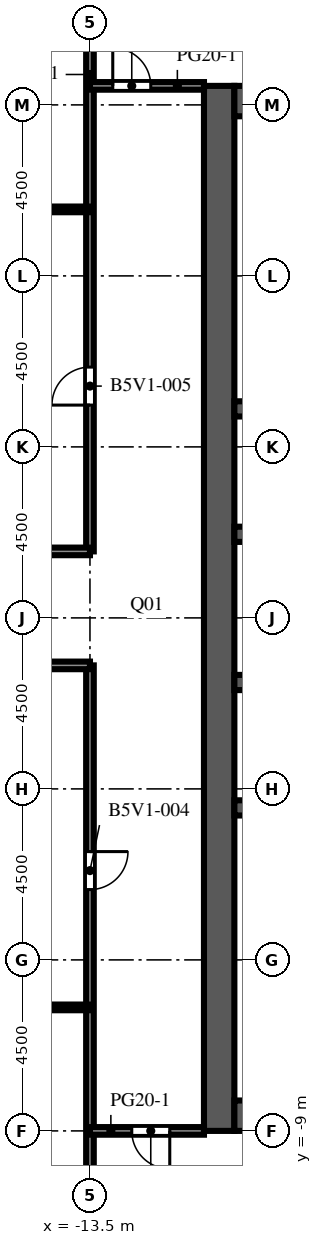
"""IFC4 building model, lengths in metres.
Left out: names, types, materials, properties, quantities, classifications, styles, units other than length and angle.
Written with IfcOpenShell. Run it as: python <this file> out.ifc"""

import sys

from ifc_helpers import new_model, si_unit, direction, frame, frame_2d, origin, place, context, subcontext, project, spatial, rectangle, extrude, element, fill, save


model = new_model("IFC4")
c1 = context("Model", 3, precision=1e-05, world=origin(), true_north=direction((0.0, 1.0)))
c2 = subcontext(c1, "Body", "Model", "MODEL_VIEW")
j1 = project(units=[si_unit("LENGTHUNIT", "METRE"), si_unit("PLANEANGLEUNIT", "RADIAN")], contexts=[c1])
p1 = place(None, origin())
s1 = spatial("IfcSite", under=j1, at=p1, CompositionType="ELEMENT")
p2 = place(p1, origin())
s2 = spatial("IfcBuilding", under=s1, at=p2, CompositionType="ELEMENT")
p3 = place(p2, frame((0.0, 0.0, 173.2)))
s3 = spatial("IfcBuildingStorey", under=s2, at=p3, CompositionType="ELEMENT", Elevation=173.2)
p4 = place(p3, frame((-10.1, -9.0, 0.0), z_axis=(0.0, 0.0, 1.0), x_axis=(0.0, 1.0, 0.0)))
e1 = element("IfcWall", 1, at=p4, inside=s3, PredefinedType="SHEAR", context=c2, shape_type="SweptSolid", body=[
    extrude(rectangle(XDim=27.5, YDim=0.8, at=frame_2d((13.75, 0.0))), origin(), (0.0, 0.0, 1.0), 4.1),
])
p5 = place(p4, frame((12.55, 0.0, 0.0)))
e2 = element("IfcOpeningElement", 2, at=p5, cuts=e1, PredefinedType="OPENING", context=c2, shape_type="SweptSolid", body=[
    extrude(rectangle(XDim=2.4, YDim=2.4, at=frame_2d((1.2, 1.2))), frame((0.0, 0.41, 0.0), z_axis=(0.0, -1.0, 0.0), x_axis=(1.0, 0.0, 0.0)), (0.0, 0.0, 1.0), 0.82),
])
p6 = place(p4, frame((6.825, 0.0, 0.0)))
e3 = element("IfcOpeningElement", 3, at=p6, cuts=e1, PredefinedType="OPENING", context=c2, shape_type="SweptSolid", body=[
    extrude(rectangle(XDim=1.2, YDim=2.1, at=frame_2d((0.6, 1.05))), frame((0.0, 0.41, 0.0), z_axis=(0.0, -1.0, 0.0), x_axis=(1.0, 0.0, 0.0)), (0.0, 0.0, 1.0), 0.82),
])
p7 = place(p4, frame((19.475, 0.0, 0.0)))
e4 = element("IfcOpeningElement", 4, at=p7, cuts=e1, PredefinedType="OPENING", context=c2, shape_type="SweptSolid", body=[
    extrude(rectangle(XDim=1.2, YDim=2.1, at=frame_2d((0.6, 1.05))), frame((0.0, 0.41, 0.0), z_axis=(0.0, -1.0, 0.0), x_axis=(1.0, 0.0, 0.0)), (0.0, 0.0, 1.0), 0.82),
])
for number, where, z_axis, x_axis in (
    (5, (-9.7, -8.6, 0.0), (0.0, 0.0, 1.0), (1.0, 0.0, 0.0)),
    (6, (-9.7, 18.1, 0.0), (0.0, 0.0, 1.0), (1.0, 0.0, 0.0)),
):
    element("IfcWall", number, at=place(p3, frame(where, z_axis=z_axis, x_axis=x_axis)), inside=s3, PredefinedType="SHEAR", context=c2, shape_type="SweptSolid", body=[
        extrude(rectangle(XDim=10.4, YDim=0.8, at=frame_2d((5.2, 0.0))), origin(), (0.0, 0.0, 1.0), 4.1),
    ])
p8 = place(p3, frame((-9.7, -0.5, 0.0), z_axis=(0.0, 0.0, 1.0), x_axis=(1.0, 0.0, 0.0)))
e7 = element("IfcWall", 7, at=p8, inside=s3, PredefinedType="SHEAR", context=c2, shape_type="SweptSolid", body=[
    extrude(rectangle(XDim=10.4, YDim=0.4, at=frame_2d((5.2, 0.0))), origin(), (0.0, 0.0, 1.0), 4.1),
])
p9 = place(p3, frame((-9.7, 2.8, 0.0), z_axis=(0.0, 0.0, 1.0), x_axis=(1.0, 0.0, 0.0)))
e8 = element("IfcWall", 8, at=p9, inside=s3, PredefinedType="SHEAR", context=c2, shape_type="SweptSolid", body=[
    extrude(rectangle(XDim=10.4, YDim=0.4, at=frame_2d((5.2, 0.0))), origin(), (0.0, 0.0, 1.0), 4.1),
])
p10 = place(p9, frame((0.738, 0.0, 0.0)))
e9 = element("IfcOpeningElement", 9, at=p10, cuts=e8, PredefinedType="OPENING", context=c2, shape_type="SweptSolid", body=[
    extrude(rectangle(XDim=1.1, YDim=2.1, at=frame_2d((0.55, 1.05))), frame((0.0, 0.21, 0.0), z_axis=(0.0, -1.0, 0.0), x_axis=(1.0, 0.0, 0.0)), (0.0, 0.0, 1.0), 0.42),
])
p11 = place(p9, frame((3.337, 0.0, 0.0)))
e10 = element("IfcOpeningElement", 10, at=p11, cuts=e8, PredefinedType="OPENING", context=c2, shape_type="SweptSolid", body=[
    extrude(rectangle(XDim=1.1, YDim=2.1, at=frame_2d((0.55, 1.05))), frame((0.0, 0.21, 0.0), z_axis=(0.0, -1.0, 0.0), x_axis=(1.0, 0.0, 0.0)), (0.0, 0.0, 1.0), 0.42),
])
p12 = place(p9, frame((6.012, 0.0, 0.0)))
e11 = element("IfcOpeningElement", 11, at=p12, cuts=e8, PredefinedType="OPENING", context=c2, shape_type="SweptSolid", body=[
    extrude(rectangle(XDim=1.0, YDim=2.1, at=frame_2d((0.5, 1.05))), frame((0.0, 0.21, 0.0), z_axis=(0.0, -1.0, 0.0), x_axis=(1.0, 0.0, 0.0)), (0.0, 0.0, 1.0), 0.42),
])
p13 = place(p9, frame((8.613, 0.0, 0.0)))
e12 = element("IfcOpeningElement", 12, at=p13, cuts=e8, PredefinedType="OPENING", context=c2, shape_type="SweptSolid", body=[
    extrude(rectangle(XDim=1.0, YDim=2.1, at=frame_2d((0.5, 1.05))), frame((0.0, 0.21, 0.0), z_axis=(0.0, -1.0, 0.0), x_axis=(1.0, 0.0, 0.0)), (0.0, 0.0, 1.0), 0.42),
])
p14 = place(p3, frame((-9.7, 6.7, 0.0), z_axis=(0.0, 0.0, 1.0), x_axis=(1.0, 0.0, 0.0)))
e13 = element("IfcWall", 13, at=p14, inside=s3, PredefinedType="SHEAR", context=c2, shape_type="SweptSolid", body=[
    extrude(rectangle(XDim=10.4, YDim=0.4, at=frame_2d((5.2, 0.0))), origin(), (0.0, 0.0, 1.0), 4.1),
])
p15 = place(p14, frame((3.337, 0.0, 0.0)))
e14 = element("IfcOpeningElement", 14, at=p15, cuts=e13, PredefinedType="OPENING", context=c2, shape_type="SweptSolid", body=[
    extrude(rectangle(XDim=1.1, YDim=2.1, at=frame_2d((0.55, 1.05))), frame((0.0, 0.21, 0.0), z_axis=(0.0, -1.0, 0.0), x_axis=(1.0, 0.0, 0.0)), (0.0, 0.0, 1.0), 0.42),
])
p16 = place(p14, frame((5.962, 0.0, 0.0)))
e15 = element("IfcOpeningElement", 15, at=p16, cuts=e13, PredefinedType="OPENING", context=c2, shape_type="SweptSolid", body=[
    extrude(rectangle(XDim=1.1, YDim=2.1, at=frame_2d((0.55, 1.05))), frame((0.0, 0.21, 0.0), z_axis=(0.0, -1.0, 0.0), x_axis=(1.0, 0.0, 0.0)), (0.0, 0.0, 1.0), 0.42),
])
p17 = place(p14, frame((8.663, 0.0, 0.0)))
e16 = element("IfcOpeningElement", 16, at=p17, cuts=e13, PredefinedType="OPENING", context=c2, shape_type="SweptSolid", body=[
    extrude(rectangle(XDim=1.1, YDim=2.1, at=frame_2d((0.55, 1.05))), frame((0.0, 0.21, 0.0), z_axis=(0.0, -1.0, 0.0), x_axis=(1.0, 0.0, 0.0)), (0.0, 0.0, 1.0), 0.42),
])
p18 = place(p14, frame((0.688, 0.0, 0.0)))
e17 = element("IfcOpeningElement", 17, at=p18, cuts=e13, PredefinedType="OPENING", context=c2, shape_type="SweptSolid", body=[
    extrude(rectangle(XDim=1.0, YDim=2.1, at=frame_2d((0.5, 1.05))), frame((0.0, 0.21, 0.0), z_axis=(0.0, -1.0, 0.0), x_axis=(1.0, 0.0, 0.0)), (0.0, 0.0, 1.0), 0.42),
])
p19 = place(p3, frame((-9.7, 10.0, 0.0), z_axis=(0.0, 0.0, 1.0), x_axis=(1.0, 0.0, 0.0)))
e18 = element("IfcWall", 18, at=p19, inside=s3, PredefinedType="SHEAR", context=c2, shape_type="SweptSolid", body=[
    extrude(rectangle(XDim=10.4, YDim=0.4, at=frame_2d((5.2, 0.0))), origin(), (0.0, 0.0, 1.0), 4.1),
])
p20 = place(p3, frame((-13.5, -26.5, 0.0), z_axis=(0.0, 0.0, 1.0), x_axis=(0.0, 1.0, 0.0)))
e19 = element("IfcWall", 19, at=p20, inside=s3, PredefinedType="PARTITIONING", context=c2, shape_type="SweptSolid", body=[
    extrude(rectangle(XDim=29.75, YDim=0.2, at=frame_2d((14.875, 0.0))), origin(), (0.0, 0.0, 1.0), 3.65),
])
p21 = place(p20, frame((23.85, 0.0, 0.0)))
e20 = element("IfcOpeningElement", 20, at=p21, cuts=e19, PredefinedType="OPENING", context=c2, shape_type="SweptSolid", body=[
    extrude(rectangle(XDim=1.0, YDim=2.1, at=frame_2d((0.5, 1.05))), frame((0.0, 0.11, 0.0), z_axis=(0.0, -1.0, 0.0), x_axis=(1.0, 0.0, 0.0)), (0.0, 0.0, 1.0), 0.22),
])
p22 = place(p3, frame((-13.5, 6.25, 0.0), z_axis=(0.0, 0.0, 1.0), x_axis=(0.0, 1.0, 0.0)))
e21 = element("IfcWall", 21, at=p22, inside=s3, PredefinedType="PARTITIONING", context=c2, shape_type="SweptSolid", body=[
    extrude(rectangle(XDim=20.25, YDim=0.2, at=frame_2d((10.125, 0.0))), origin(), (0.0, 0.0, 1.0), 3.65),
])
p23 = place(p22, frame((3.85, 0.0, 0.0)))
e22 = element("IfcOpeningElement", 22, at=p23, cuts=e21, PredefinedType="OPENING", context=c2, shape_type="SweptSolid", body=[
    extrude(rectangle(XDim=1.0, YDim=2.1, at=frame_2d((0.5, 1.05))), frame((0.0, 0.11, 0.0), z_axis=(0.0, -1.0, 0.0), x_axis=(1.0, 0.0, 0.0)), (0.0, 0.0, 1.0), 0.22),
])
p24 = place(p3, frame((-10.5, -9.0, 0.0), z_axis=(0.0, 0.0, 1.0), x_axis=(-1.0, 0.0, 0.0)))
e23 = element("IfcWall", 23, at=p24, inside=s3, PredefinedType="PARTITIONING", context=c2, shape_type="SweptSolid", body=[
    extrude(rectangle(XDim=3.0, YDim=0.2, at=frame_2d((1.5, 0.0))), origin(), (0.0, 0.0, 1.0), 3.65),
])
p25 = place(p24, frame((0.9, 0.0, 0.0)))
e24 = element("IfcOpeningElement", 24, at=p25, cuts=e23, PredefinedType="OPENING", context=c2, shape_type="SweptSolid", body=[
    extrude(rectangle(XDim=1.0, YDim=2.1, at=frame_2d((0.5, 1.05))), frame((0.0, 0.11, 0.0), z_axis=(0.0, -1.0, 0.0), x_axis=(1.0, 0.0, 0.0)), (0.0, 0.0, 1.0), 0.22),
])
p26 = place(p3, frame((-13.5, -5.75, 0.0), z_axis=(0.0, 0.0, 1.0), x_axis=(-1.0, 0.0, 0.0)))
e25 = element("IfcWall", 25, at=p26, inside=s3, PredefinedType="PARTITIONING", context=c2, shape_type="SweptSolid", body=[
    extrude(rectangle(XDim=13.35, YDim=0.15, at=frame_2d((6.675, 0.0))), origin(), (0.0, 0.0, 1.0), 3.65),
])
p27 = place(p26, frame((8.9, 0.0, 0.0)))
e26 = element("IfcOpeningElement", 26, at=p27, cuts=e25, PredefinedType="OPENING", context=c2, shape_type="SweptSolid", body=[
    extrude(rectangle(XDim=1.0, YDim=2.1, at=frame_2d((0.5, 1.05))), frame((0.0, 0.085, 0.0), z_axis=(0.0, -1.0, 0.0), x_axis=(1.0, 0.0, 0.0)), (0.0, 0.0, 1.0), 0.17),
])
p28 = place(p26, frame((1.65, 0.0, 0.0)))
e27 = element("IfcOpeningElement", 27, at=p28, cuts=e25, PredefinedType="OPENING", context=c2, shape_type="SweptSolid", body=[
    extrude(rectangle(XDim=1.0, YDim=2.1, at=frame_2d((0.5, 1.05))), frame((0.0, 0.085, 0.0), z_axis=(0.0, -1.0, 0.0), x_axis=(1.0, 0.0, 0.0)), (0.0, 0.0, 1.0), 0.17),
])
p29 = place(p3, frame((-13.5, 3.25, 0.0), z_axis=(0.0, 0.0, 1.0), x_axis=(-1.0, 0.0, 0.0)))
e28 = element("IfcWall", 28, at=p29, inside=s3, PredefinedType="PARTITIONING", context=c2, shape_type="SweptSolid", body=[
    extrude(rectangle(XDim=13.35, YDim=0.2, at=frame_2d((6.675, 0.0))), origin(), (0.0, 0.0, 1.0), 3.65),
])
p30 = place(p29, frame((8.15, 0.0, 0.0)))
e29 = element("IfcOpeningElement", 29, at=p30, cuts=e28, PredefinedType="OPENING", context=c2, shape_type="SweptSolid", body=[
    extrude(rectangle(XDim=1.0, YDim=2.1, at=frame_2d((0.5, 1.05))), frame((0.0, 0.11, 0.0), z_axis=(0.0, -1.0, 0.0), x_axis=(1.0, 0.0, 0.0)), (0.0, 0.0, 1.0), 0.22),
])
p31 = place(p3, frame((-26.85, 6.25, 0.0), z_axis=(0.0, 0.0, 1.0), x_axis=(1.0, 0.0, 0.0)))
e30 = element("IfcWall", 30, at=p31, inside=s3, PredefinedType="PARTITIONING", context=c2, shape_type="SweptSolid", body=[
    extrude(rectangle(XDim=13.35, YDim=0.2, at=frame_2d((6.675, 0.0))), origin(), (0.0, 0.0, 1.0), 3.65),
])
p32 = place(p31, frame((2.45, 0.0, 0.0)))
e31 = element("IfcOpeningElement", 31, at=p32, cuts=e30, PredefinedType="OPENING", context=c2, shape_type="SweptSolid", body=[
    extrude(rectangle(XDim=1.0, YDim=2.1, at=frame_2d((0.5, 1.05))), frame((0.0, 0.11, 0.0), z_axis=(0.0, -1.0, 0.0), x_axis=(1.0, 0.0, 0.0)), (0.0, 0.0, 1.0), 0.22),
])
p33 = place(p3, frame((-26.85, 15.25, 0.0), z_axis=(0.0, 0.0, 1.0), x_axis=(1.0, 0.0, 0.0)))
e32 = element("IfcWall", 32, at=p33, inside=s3, PredefinedType="PARTITIONING", context=c2, shape_type="SweptSolid", body=[
    extrude(rectangle(XDim=13.35, YDim=0.15, at=frame_2d((6.675, 0.0))), origin(), (0.0, 0.0, 1.0), 3.65),
])
p34 = place(p33, frame((2.95, 0.0, 0.0)))
e33 = element("IfcOpeningElement", 33, at=p34, cuts=e32, PredefinedType="OPENING", context=c2, shape_type="SweptSolid", body=[
    extrude(rectangle(XDim=1.0, YDim=2.1, at=frame_2d((0.5, 1.05))), frame((0.0, 0.085, 0.0), z_axis=(0.0, -1.0, 0.0), x_axis=(1.0, 0.0, 0.0)), (0.0, 0.0, 1.0), 0.17),
])
p35 = place(p33, frame((10.2, 0.0, 0.0)))
e34 = element("IfcOpeningElement", 34, at=p35, cuts=e32, PredefinedType="OPENING", context=c2, shape_type="SweptSolid", body=[
    extrude(rectangle(XDim=1.0, YDim=2.1, at=frame_2d((0.5, 1.05))), frame((0.0, 0.085, 0.0), z_axis=(0.0, -1.0, 0.0), x_axis=(1.0, 0.0, 0.0)), (0.0, 0.0, 1.0), 0.17),
])
p36 = place(p3, frame((-13.5, 18.5, 0.0), z_axis=(0.0, 0.0, 1.0), x_axis=(1.0, 0.0, 0.0)))
e35 = element("IfcWall", 35, at=p36, inside=s3, PredefinedType="PARTITIONING", context=c2, shape_type="SweptSolid", body=[
    extrude(rectangle(XDim=3.0, YDim=0.2, at=frame_2d((1.5, 0.0))), origin(), (0.0, 0.0, 1.0), 3.65),
])
p37 = place(p36, frame((0.6, 0.0, 0.0)))
e36 = element("IfcOpeningElement", 36, at=p37, cuts=e35, PredefinedType="OPENING", context=c2, shape_type="SweptSolid", body=[
    extrude(rectangle(XDim=1.0, YDim=2.1, at=frame_2d((0.5, 1.05))), frame((0.0, 0.11, 0.0), z_axis=(0.0, -1.0, 0.0), x_axis=(1.0, 0.0, 0.0)), (0.0, 0.0, 1.0), 0.22),
])
p38 = place(p5, origin())
e37 = element("IfcDoor", 37, at=p38, inside=s3, OperationType="DOUBLE_DOOR_DOUBLE_SWING", PredefinedType="DOOR", context=c2, shape_type="SweptSolid", body=[
    extrude(rectangle(XDim=2.4, YDim=2.4, at=frame_2d((1.2, 1.2))), frame((0.0, 0.025, 0.0), z_axis=(0.0, -1.0, 0.0), x_axis=(1.0, 0.0, 0.0)), (0.0, 0.0, 1.0), 0.05),
])
fill(e2, e37)
p39 = place(p6, origin())
e38 = element("IfcDoor", 38, at=p39, inside=s3, OperationType="SINGLE_SWING_LEFT", PredefinedType="DOOR", context=c2, shape_type="SweptSolid", body=[
    extrude(rectangle(XDim=1.2, YDim=2.1, at=frame_2d((0.6, 1.05))), frame((0.0, 0.025, 0.0), z_axis=(0.0, -1.0, 0.0), x_axis=(1.0, 0.0, 0.0)), (0.0, 0.0, 1.0), 0.05),
])
fill(e3, e38)
p40 = place(p7, origin())
e39 = element("IfcDoor", 39, at=p40, inside=s3, OperationType="SINGLE_SWING_LEFT", PredefinedType="DOOR", context=c2, shape_type="SweptSolid", body=[
    extrude(rectangle(XDim=1.2, YDim=2.1, at=frame_2d((0.6, 1.05))), frame((0.0, 0.025, 0.0), z_axis=(0.0, -1.0, 0.0), x_axis=(1.0, 0.0, 0.0)), (0.0, 0.0, 1.0), 0.05),
])
fill(e4, e39)
p41 = place(p21, origin())
e40 = element("IfcDoor", 40, at=p41, inside=s3, OperationType="SINGLE_SWING_RIGHT", PredefinedType="DOOR", context=c2, shape_type="SweptSolid", body=[
    extrude(rectangle(XDim=1.0, YDim=2.1, at=frame_2d((0.5, 1.05))), frame((0.0, 0.025, 0.0), z_axis=(0.0, -1.0, 0.0), x_axis=(1.0, 0.0, 0.0)), (0.0, 0.0, 1.0), 0.05),
])
fill(e20, e40)
p42 = place(p23, origin())
e41 = element("IfcDoor", 41, at=p42, inside=s3, OperationType="SINGLE_SWING_LEFT", PredefinedType="DOOR", context=c2, shape_type="SweptSolid", body=[
    extrude(rectangle(XDim=1.0, YDim=2.1, at=frame_2d((0.5, 1.05))), frame((0.0, 0.025, 0.0), z_axis=(0.0, -1.0, 0.0), x_axis=(1.0, 0.0, 0.0)), (0.0, 0.0, 1.0), 0.05),
])
fill(e22, e41)
p43 = place(p25, origin())
e42 = element("IfcDoor", 42, at=p43, inside=s3, OperationType="SINGLE_SWING_LEFT", PredefinedType="DOOR", context=c2, shape_type="SweptSolid", body=[
    extrude(rectangle(XDim=1.0, YDim=2.1, at=frame_2d((0.5, 1.05))), frame((0.0, 0.025, 0.0), z_axis=(0.0, -1.0, 0.0), x_axis=(1.0, 0.0, 0.0)), (0.0, 0.0, 1.0), 0.05),
])
fill(e24, e42)
p44 = place(p37, origin())
e43 = element("IfcDoor", 43, at=p44, inside=s3, OperationType="SINGLE_SWING_LEFT", PredefinedType="DOOR", context=c2, shape_type="SweptSolid", body=[
    extrude(rectangle(XDim=1.0, YDim=2.1, at=frame_2d((0.5, 1.05))), frame((0.0, 0.025, 0.0), z_axis=(0.0, -1.0, 0.0), x_axis=(1.0, 0.0, 0.0)), (0.0, 0.0, 1.0), 0.05),
])
fill(e36, e43)
save(model, sys.argv[1])
